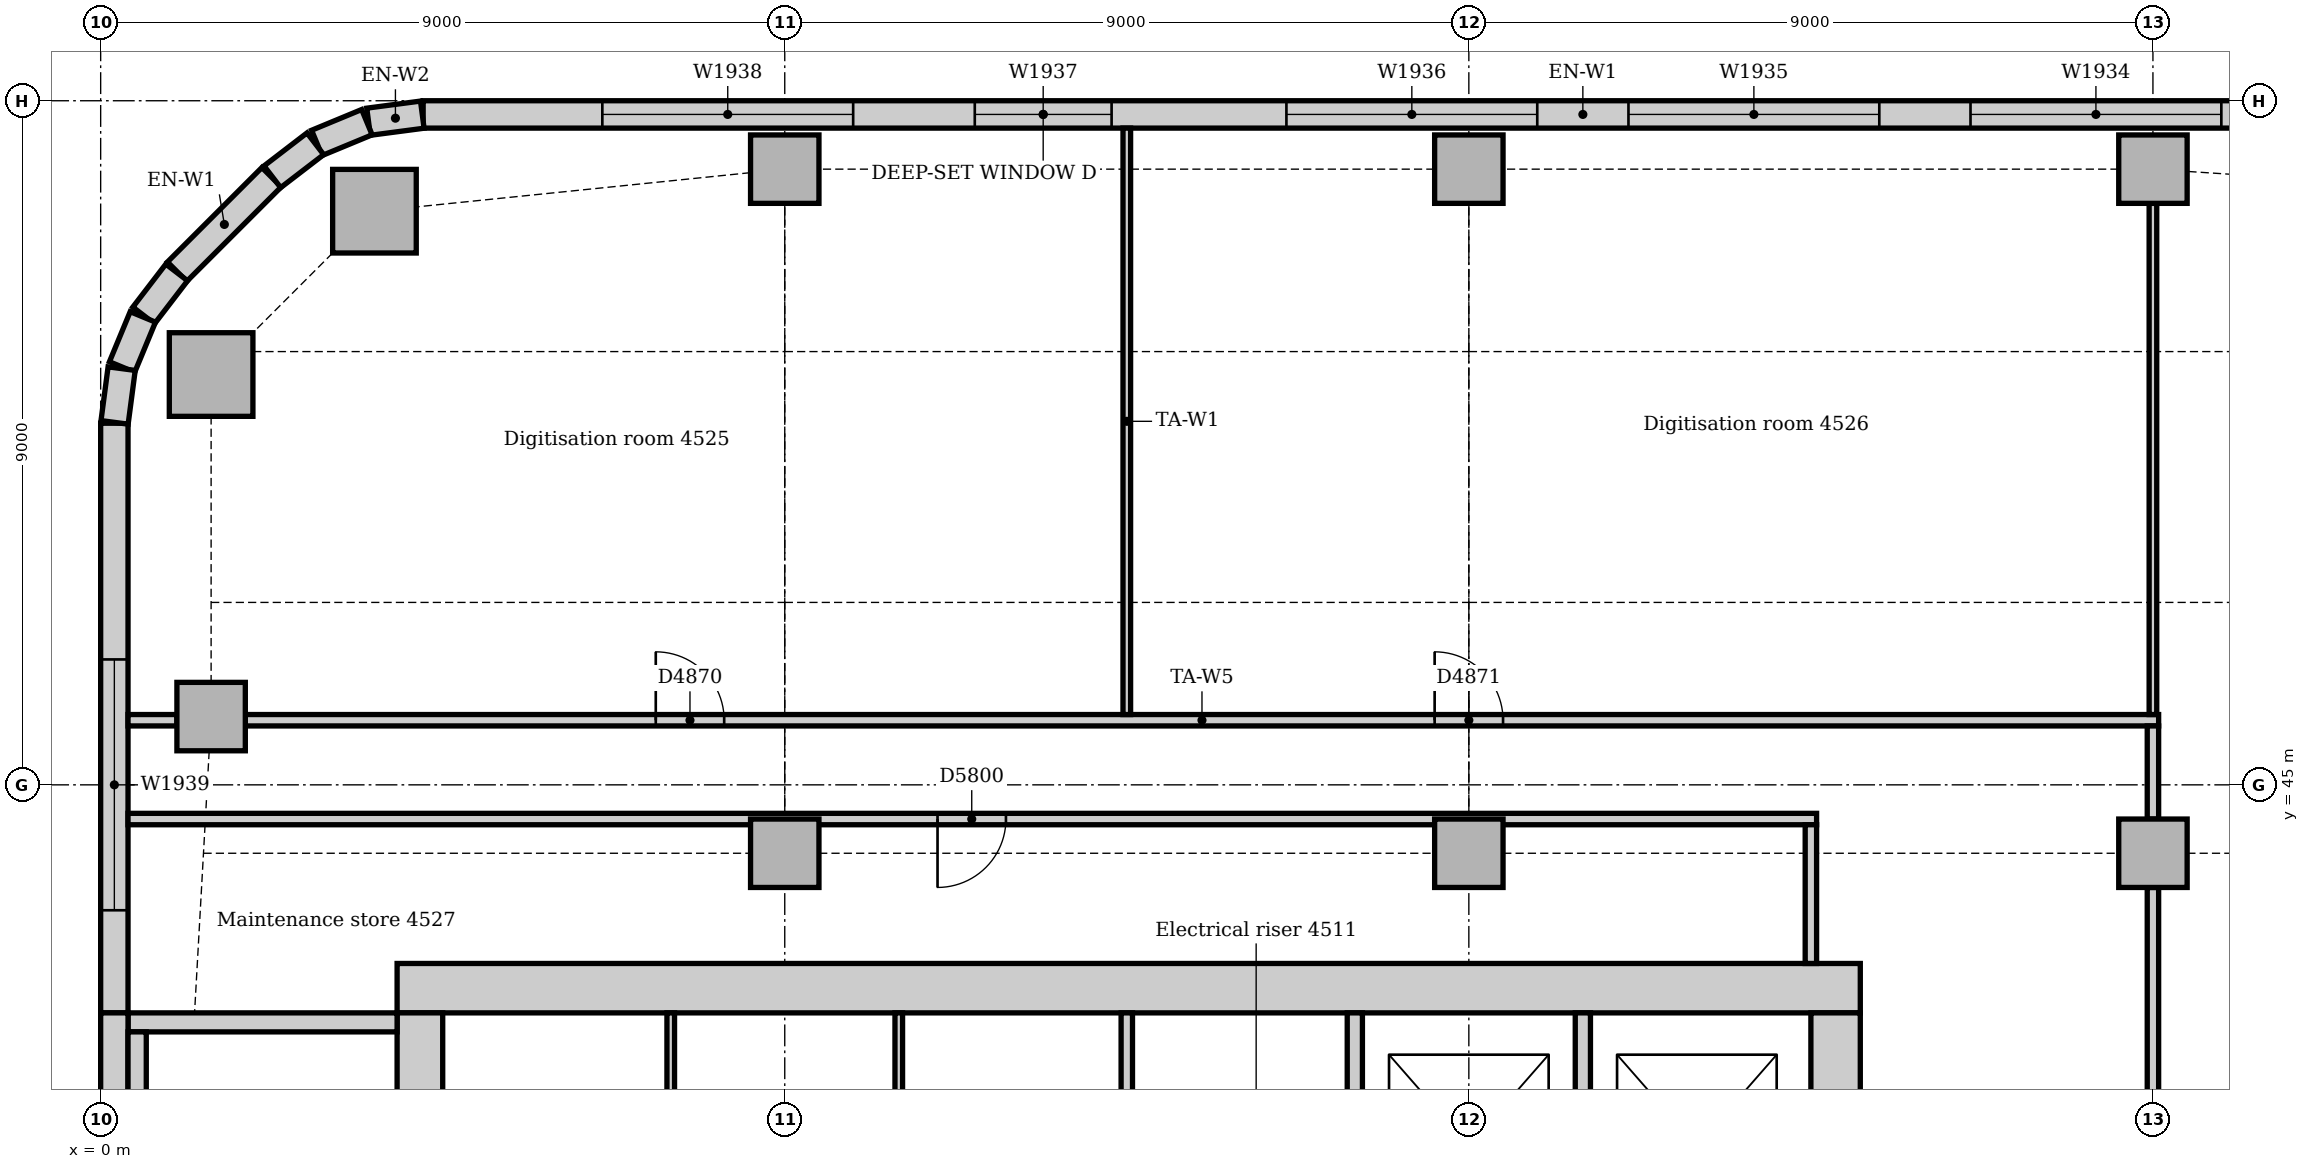
"""IFC4 building model, lengths in metres.
Left out: names, types, materials, properties, quantities, classifications, styles, units other than length and angle.
Written with IfcOpenShell. Run it as: python <this file> out.ifc"""

import sys

from ifc_helpers import new_model, si_unit, direction, frame, frame_2d, origin, origin_2d, place, context, subcontext, project, spatial, rectangle, extrude, element, fill, save


model = new_model("IFC4")
c1 = context("Model", 3, precision=1e-05, world=origin(), true_north=direction((0.0, 1.0)))
c2 = subcontext(c1, "Body", "Model", "MODEL_VIEW")
j1 = project(units=[si_unit("LENGTHUNIT", "METRE"), si_unit("PLANEANGLEUNIT", "RADIAN")], contexts=[c1])
p1 = place(None, origin())
s1 = spatial("IfcSite", under=j1, at=p1, CompositionType="ELEMENT")
p2 = place(p1, origin())
s2 = spatial("IfcBuilding", under=s1, at=p2, CompositionType="ELEMENT")
p3 = place(p2, frame((0.0, 0.0, 189.0)))
s3 = spatial("IfcBuildingStorey", under=s2, at=p3, CompositionType="ELEMENT", Elevation=189.0)
p4 = place(p3, frame((23.15, 42.325, 0.0), z_axis=(0.0, 0.0, 1.0), x_axis=(-1.0, 0.0, 0.0)))
e1 = element("IfcWall", 1, at=p4, inside=s3, PredefinedType="SOLIDWALL", context=c2, shape_type="SweptSolid", body=[
    extrude(rectangle(XDim=19.25, YDim=0.65, at=frame_2d((9.625, 0.0))), origin(), (0.0, 0.0, 1.0), 4.0),
])
p5 = place(p3, frame((22.825, 31.5, 0.0), z_axis=(0.0, 0.0, 1.0), x_axis=(0.0, 1.0, 0.0)))
e2 = element("IfcWall", 2, at=p5, inside=s3, PredefinedType="SOLIDWALL", context=c2, shape_type="SweptSolid", body=[
    extrude(rectangle(XDim=10.5, YDim=0.65, at=frame_2d((5.25, 0.0))), origin(), (0.0, 0.0, 1.0), 4.0),
])
p6 = place(p5, frame((3.15, 0.0, 0.0)))
e3 = element("IfcOpeningElement", 3, at=p6, cuts=e2, PredefinedType="OPENING", context=c2, shape_type="SweptSolid", body=[
    extrude(rectangle(XDim=1.0, YDim=2.1, at=frame_2d((0.5, 1.05))), frame((0.0, 0.335, 0.0), z_axis=(0.0, -1.0, 0.0), x_axis=(1.0, 0.0, 0.0)), (0.0, 0.0, 1.0), 0.67),
])
p7 = place(p5, frame((5.2, 0.0, 0.0)))
e4 = element("IfcOpeningElement", 4, at=p7, cuts=e2, PredefinedType="OPENING", context=c2, shape_type="SweptSolid", body=[
    extrude(rectangle(XDim=1.0, YDim=2.1, at=frame_2d((0.5, 1.05))), frame((0.0, 0.335, 0.0), z_axis=(0.0, -1.0, 0.0), x_axis=(1.0, 0.0, 0.0)), (0.0, 0.0, 1.0), 0.67),
])
p8 = place(p3, frame((4.2, 42.0, 0.0), z_axis=(0.0, 0.0, 1.0), x_axis=(0.0, -1.0, 0.0)))
e5 = element("IfcWall", 5, at=p8, inside=s3, PredefinedType="SOLIDWALL", context=c2, shape_type="SweptSolid", body=[
    extrude(rectangle(XDim=10.5, YDim=0.6, at=frame_2d((5.25, 0.0))), origin(), (0.0, 0.0, 1.0), 4.0),
])
p9 = place(p8, frame((5.3, 0.0, 0.0)))
e6 = element("IfcOpeningElement", 6, at=p9, cuts=e5, PredefinedType="OPENING", context=c2, shape_type="SweptSolid", body=[
    extrude(rectangle(XDim=1.0, YDim=2.1, at=frame_2d((0.5, 1.05))), frame((0.0, 0.31, 0.0), z_axis=(0.0, -1.0, 0.0), x_axis=(1.0, 0.0, 0.0)), (0.0, 0.0, 1.0), 0.62),
])
p10 = place(p3, frame((3.9, 41.875, 0.0), z_axis=(0.0, 0.0, 1.0), x_axis=(-1.0, 0.0, 0.0)))
e7 = element("IfcWall", 7, at=p10, inside=s3, PredefinedType="SOLIDWALL", context=c2, shape_type="SweptSolid", body=[
    extrude(rectangle(XDim=3.54, YDim=0.25, at=frame_2d((1.77, 0.0))), origin(), (0.0, 0.0, 1.0), 4.0),
])
for number, where, z_axis, x_axis in (
    (8, (3.602, 52.547, 0.0), (0.0, 0.0, 1.0), (1.0, 0.0, 0.0)),
    (9, (1.453, 50.398, 0.0), (0.0, 0.0, 1.0), (1.0, 0.0, 0.0)),
):
    element("IfcColumn", number, at=place(p3, frame(where, z_axis=z_axis, x_axis=x_axis)), inside=s3, PredefinedType="COLUMN", context=c2, shape_type="SweptSolid", body=[
        extrude(rectangle(XDim=1.1, YDim=1.1, at=origin_2d()), origin(), (0.0, 0.0, 1.0), 3.7),
    ])
for number, where, z_axis, x_axis in (
    (10, (9.0, 53.1, 0.0), (0.0, 0.0, 1.0), (1.0, 0.0, 0.0)),
    (11, (18.0, 53.1, 0.0), (0.0, 0.0, 1.0), (1.0, 0.0, 0.0)),
    (12, (27.0, 53.1, 0.0), (0.0, 0.0, 1.0), (1.0, 0.0, 0.0)),
    (13, (1.453, 45.898, 0.0), (0.0, 0.0, 1.0), (1.0, 0.0, 0.0)),
    (14, (9.0, 44.1, 0.0), (0.0, 0.0, 1.0), (1.0, 0.0, 0.0)),
    (15, (18.0, 44.1, 0.0), (0.0, 0.0, 1.0), (1.0, 0.0, 0.0)),
    (16, (27.0, 44.1, 0.0), (0.0, 0.0, 1.0), (1.0, 0.0, 0.0)),
):
    element("IfcColumn", number, at=place(p3, frame(where, z_axis=z_axis, x_axis=x_axis)), inside=s3, PredefinedType="COLUMN", context=c2, shape_type="SweptSolid", body=[
        extrude(rectangle(XDim=0.9, YDim=0.9, at=origin_2d()), origin(), (0.0, 0.0, 1.0), 3.7),
    ])
p11 = place(p3, frame((34.757, 53.82, 0.0), z_axis=(0.0, 0.0, 1.0), x_axis=(-1.0, 0.0, 0.0)))
e17 = element("IfcWall", 17, at=p11, inside=s3, PredefinedType="STANDARD", context=c2, shape_type="SweptSolid", body=[
    extrude(rectangle(XDim=30.515, YDim=0.36, at=frame_2d((15.257, 0.0))), origin(), (0.0, 0.0, 1.0), 3.7),
])
p12 = place(p11, frame((2.357, 0.0, 0.9)))
e18 = element("IfcOpeningElement", 18, at=p12, cuts=e17, PredefinedType="OPENING", context=c2, shape_type="SweptSolid", body=[
    extrude(rectangle(XDim=3.3, YDim=1.6, at=frame_2d((1.65, 0.8))), frame((0.0, 0.19, 0.0), z_axis=(0.0, -1.0, 0.0), x_axis=(1.0, 0.0, 0.0)), (0.0, 0.0, 1.0), 0.38),
])
p13 = place(p11, frame((6.857, 0.0, 0.9)))
e19 = element("IfcOpeningElement", 19, at=p13, cuts=e17, PredefinedType="OPENING", context=c2, shape_type="SweptSolid", body=[
    extrude(rectangle(XDim=3.3, YDim=1.6, at=frame_2d((1.65, 0.8))), frame((0.0, 0.19, 0.0), z_axis=(0.0, -1.0, 0.0), x_axis=(1.0, 0.0, 0.0)), (0.0, 0.0, 1.0), 0.38),
])
p14 = place(p11, frame((11.357, 0.0, 0.9)))
e20 = element("IfcOpeningElement", 20, at=p14, cuts=e17, PredefinedType="OPENING", context=c2, shape_type="SweptSolid", body=[
    extrude(rectangle(XDim=3.3, YDim=1.6, at=frame_2d((1.65, 0.8))), frame((0.0, 0.19, 0.0), z_axis=(0.0, -1.0, 0.0), x_axis=(1.0, 0.0, 0.0)), (0.0, 0.0, 1.0), 0.38),
])
p15 = place(p11, frame((15.857, 0.0, 0.9)))
e21 = element("IfcOpeningElement", 21, at=p15, cuts=e17, PredefinedType="OPENING", context=c2, shape_type="SweptSolid", body=[
    extrude(rectangle(XDim=3.3, YDim=1.6, at=frame_2d((1.65, 0.8))), frame((0.0, 0.19, 0.0), z_axis=(0.0, -1.0, 0.0), x_axis=(1.0, 0.0, 0.0)), (0.0, 0.0, 1.0), 0.38),
])
p16 = place(p11, frame((21.457, 0.0, 0.9)))
e22 = element("IfcOpeningElement", 22, at=p16, cuts=e17, PredefinedType="OPENING", context=c2, shape_type="SweptSolid", body=[
    extrude(rectangle(XDim=1.8, YDim=1.6, at=frame_2d((0.9, 0.8))), frame((0.0, 0.19, 0.0), z_axis=(0.0, -1.0, 0.0), x_axis=(1.0, 0.0, 0.0)), (0.0, 0.0, 1.0), 0.38),
])
p17 = place(p11, frame((24.857, 0.0, 0.9)))
e23 = element("IfcOpeningElement", 23, at=p17, cuts=e17, PredefinedType="OPENING", context=c2, shape_type="SweptSolid", body=[
    extrude(rectangle(XDim=3.3, YDim=1.6, at=frame_2d((1.65, 0.8))), frame((0.0, 0.19, 0.0), z_axis=(0.0, -1.0, 0.0), x_axis=(1.0, 0.0, 0.0)), (0.0, 0.0, 1.0), 0.38),
])
p18 = place(p3, frame((2.249, 52.994, 0.0), z_axis=(0.0, 0.0, 1.0), x_axis=(-0.707106781187, -0.707106781187, 0.0)))
e24 = element("IfcWall", 24, at=p18, inside=s3, PredefinedType="STANDARD", context=c2, shape_type="SweptSolid", body=[
    extrude(rectangle(XDim=1.757, YDim=0.36, at=frame_2d((0.879, 0.0))), origin(), (0.0, 0.0, 1.0), 3.7),
])
p19 = place(p3, frame((0.18, 49.757, 0.0), z_axis=(0.0, 0.0, 1.0), x_axis=(0.0, -1.0, 0.0)))
e25 = element("IfcWall", 25, at=p19, inside=s3, PredefinedType="STANDARD", context=c2, shape_type="SweptSolid", body=[
    extrude(rectangle(XDim=7.757, YDim=0.36, at=frame_2d((3.879, 0.0))), origin(), (0.0, 0.0, 1.0), 3.7),
])
p20 = place(p19, frame((3.107, 0.0, 0.9)))
e26 = element("IfcOpeningElement", 26, at=p20, cuts=e25, PredefinedType="OPENING", context=c2, shape_type="SweptSolid", body=[
    extrude(rectangle(XDim=3.3, YDim=1.6, at=frame_2d((1.65, 0.8))), frame((0.0, 0.19, 0.0), z_axis=(0.0, -1.0, 0.0), x_axis=(1.0, 0.0, 0.0)), (0.0, 0.0, 1.0), 0.38),
])
p21 = place(p3, frame((0.18, 42.0, 0.0), z_axis=(0.0, 0.0, 1.0), x_axis=(0.0, -1.0, 0.0)))
e27 = element("IfcWall", 27, at=p21, inside=s3, PredefinedType="STANDARD", context=c2, shape_type="SweptSolid", body=[
    extrude(rectangle(XDim=6.75, YDim=0.36, at=frame_2d((3.375, 0.0))), origin(), (0.0, 0.0, 1.0), 3.7),
])
for number, where, z_axis, x_axis in (
    (28, (4.231, 53.817, 0.0), (0.0, 0.0, 1.0), (-0.991, -0.131, 0.0)),
    (29, (3.503, 53.718, 0.0), (0.0, 0.0, 1.0), (-0.924, -0.383, 0.0)),
):
    element("IfcWall", number, at=place(p3, frame(where, z_axis=z_axis, x_axis=x_axis)), inside=s3, PredefinedType="STANDARD", context=c2, shape_type="SweptSolid", body=[
        extrude(rectangle(XDim=0.713, YDim=0.36, at=frame_2d((0.356, 0.0))), origin(), (0.0, 0.0, 1.0), 3.7),
    ])
for number, where, z_axis, x_axis in (
    (30, (2.825, 53.434, 0.0), (0.0, 0.0, 1.0), (-0.793, -0.609, 0.0)),
    (31, (1.0, 51.741, 0.0), (0.0, 0.0, 1.0), (-0.609, -0.793, 0.0)),
):
    element("IfcWall", number, at=place(p3, frame(where, z_axis=z_axis, x_axis=x_axis)), inside=s3, PredefinedType="STANDARD", context=c2, shape_type="SweptSolid", body=[
        extrude(rectangle(XDim=0.713, YDim=0.36, at=frame_2d((0.357, 0.0))), origin(), (0.0, 0.0, 1.0), 3.7),
    ])
for number, where, z_axis, x_axis in (
    (32, (0.555, 51.156, 0.0), (0.0, 0.0, 1.0), (-0.383, -0.924, 0.0)),
    (33, (0.276, 50.476, 0.0), (0.0, 0.0, 1.0), (-0.131, -0.991, 0.0)),
):
    element("IfcWall", number, at=place(p3, frame(where, z_axis=z_axis, x_axis=x_axis)), inside=s3, PredefinedType="STANDARD", context=c2, shape_type="SweptSolid", body=[
        extrude(rectangle(XDim=0.713, YDim=0.36, at=frame_2d((0.356, 0.0))), origin(), (0.0, 0.0, 1.0), 3.7),
    ])
p22 = place(p3, frame((0.48, 40.13, 0.0), z_axis=(0.0, 0.0, 1.0), x_axis=(0.0, 1.0, 0.0)))
e34 = element("IfcWall", 34, at=p22, inside=s3, PredefinedType="STANDARD", context=c2, shape_type="SweptSolid", body=[
    extrude(rectangle(XDim=1.62, YDim=0.24, at=frame_2d((0.81, 0.0))), origin(), (0.0, 0.0, 1.0), 4.0),
])
for number, where, z_axis, x_axis in (
    (35, (16.5, 38.6, 0.0), (0.0, 0.0, 1.0), (0.0, 1.0, 0.0)),
    (36, (19.5, 38.6, 0.0), (0.0, 0.0, 1.0), (0.0, 1.0, 0.0)),
):
    element("IfcWall", number, at=place(p3, frame(where, z_axis=z_axis, x_axis=x_axis)), inside=s3, PredefinedType="PARTITIONING", context=c2, shape_type="SweptSolid", body=[
        extrude(rectangle(XDim=3.4, YDim=0.2, at=frame_2d((1.7, 0.0))), origin(), (0.0, 0.0, 1.0), 3.7),
    ])
p23 = place(p3, frame((1.903, 45.85, 0.0), z_axis=(0.0, 0.0, 1.0), x_axis=(1.0, 0.0, 0.0)))
e37 = element("IfcWall", 37, at=p23, inside=s3, PredefinedType="PARTITIONING", context=c2, shape_type="SweptSolid", body=[
    extrude(rectangle(XDim=25.172, YDim=0.15, at=frame_2d((12.586, 0.0))), origin(), (0.0, 0.0, 1.0), 3.7),
])
p24 = place(p23, frame((5.4, 0.0, 0.0)))
e38 = element("IfcOpeningElement", 38, at=p24, cuts=e37, PredefinedType="OPENING", context=c2, shape_type="SweptSolid", body=[
    extrude(rectangle(XDim=0.9, YDim=2.1, at=frame_2d((0.45, 1.05))), frame((0.0, 0.085, 0.0), z_axis=(0.0, -1.0, 0.0), x_axis=(1.0, 0.0, 0.0)), (0.0, 0.0, 1.0), 0.17),
])
p25 = place(p23, frame((15.647, 0.0, 0.0)))
e39 = element("IfcOpeningElement", 39, at=p25, cuts=e37, PredefinedType="OPENING", context=c2, shape_type="SweptSolid", body=[
    extrude(rectangle(XDim=0.9, YDim=2.1, at=frame_2d((0.45, 1.05))), frame((0.0, 0.085, 0.0), z_axis=(0.0, -1.0, 0.0), x_axis=(1.0, 0.0, 0.0)), (0.0, 0.0, 1.0), 0.17),
])
p26 = place(p3, frame((0.36, 45.85, 0.0), z_axis=(0.0, 0.0, 1.0), x_axis=(1.0, 0.0, 0.0)))
e40 = element("IfcWall", 40, at=p26, inside=s3, PredefinedType="PARTITIONING", context=c2, shape_type="SweptSolid", body=[
    extrude(rectangle(XDim=0.643, YDim=0.15, at=frame_2d((0.322, 0.0))), origin(), (0.0, 0.0, 1.0), 3.7),
])
p27 = place(p3, frame((0.36, 44.55, 0.0), z_axis=(0.0, 0.0, 1.0), x_axis=(1.0, 0.0, 0.0)))
e41 = element("IfcWall", 41, at=p27, inside=s3, PredefinedType="PARTITIONING", context=c2, shape_type="SweptSolid", body=[
    extrude(rectangle(XDim=22.215, YDim=0.15, at=frame_2d((11.107, 0.0))), origin(), (0.0, 0.0, 1.0), 3.7),
])
p28 = place(p27, frame((10.65, 0.0, 0.0)))
e42 = element("IfcOpeningElement", 42, at=p28, cuts=e41, PredefinedType="OPENING", context=c2, shape_type="SweptSolid", body=[
    extrude(rectangle(XDim=0.9, YDim=2.1, at=frame_2d((0.45, 1.05))), frame((0.0, 0.085, 0.0), z_axis=(0.0, -1.0, 0.0), x_axis=(1.0, 0.0, 0.0)), (0.0, 0.0, 1.0), 0.17),
])
p29 = place(p3, frame((27.0, 36.45, 0.0), z_axis=(0.0, 0.0, 1.0), x_axis=(0.0, 1.0, 0.0)))
e43 = element("IfcWall", 43, at=p29, inside=s3, PredefinedType="PARTITIONING", context=c2, shape_type="SweptSolid", body=[
    extrude(rectangle(XDim=7.2, YDim=0.15, at=frame_2d((3.6, 0.0))), origin(), (0.0, 0.0, 1.0), 3.212),
])
p30 = place(p3, frame((27.0, 44.55, 0.0), z_axis=(0.0, 0.0, 1.0), x_axis=(0.0, 1.0, 0.0)))
e44 = element("IfcWall", 44, at=p30, inside=s3, PredefinedType="PARTITIONING", context=c2, shape_type="SweptSolid", body=[
    extrude(rectangle(XDim=1.225, YDim=0.15, at=frame_2d((0.613, 0.0))), origin(), (0.0, 0.0, 1.0), 3.212),
])
p31 = place(p3, frame((22.5, 42.65, 0.0), z_axis=(0.0, 0.0, 1.0), x_axis=(0.0, 1.0, 0.0)))
e45 = element("IfcWall", 45, at=p31, inside=s3, PredefinedType="PARTITIONING", context=c2, shape_type="SweptSolid", body=[
    extrude(rectangle(XDim=1.825, YDim=0.15, at=frame_2d((0.912, 0.0))), origin(), (0.0, 0.0, 1.0), 3.7),
])
p32 = place(p3, frame((13.5, 38.575, 0.0), z_axis=(0.0, 0.0, 1.0), x_axis=(0.0, 1.0, 0.0)))
e46 = element("IfcWall", 46, at=p32, inside=s3, PredefinedType="PARTITIONING", context=c2, shape_type="SweptSolid", body=[
    extrude(rectangle(XDim=3.425, YDim=0.15, at=frame_2d((1.712, 0.0))), origin(), (0.0, 0.0, 1.0), 3.7),
])
p33 = place(p3, frame((13.5, 45.925, 0.0), z_axis=(0.0, 0.0, 1.0), x_axis=(0.0, 1.0, 0.0)))
e47 = element("IfcWall", 47, at=p33, inside=s3, PredefinedType="PARTITIONING", context=c2, shape_type="SweptSolid", body=[
    extrude(rectangle(XDim=7.715, YDim=0.1, at=frame_2d((3.857, 0.0))), origin(), (0.0, 0.0, 1.0), 3.7),
])
p34 = place(p3, frame((27.0, 45.925, 0.0), z_axis=(0.0, 0.0, 1.0), x_axis=(0.0, 1.0, 0.0)))
e48 = element("IfcWall", 48, at=p34, inside=s3, PredefinedType="PARTITIONING", context=c2, shape_type="SweptSolid", body=[
    extrude(rectangle(XDim=6.725, YDim=0.1, at=frame_2d((3.362, 0.0))), origin(), (0.0, 0.0, 1.0), 3.212),
])
for number, where, z_axis, x_axis in (
    (49, (7.5, 38.575, 0.0), (0.0, 0.0, 1.0), (0.0, 1.0, 0.0)),
    (50, (10.5, 38.575, 0.0), (0.0, 0.0, 1.0), (0.0, 1.0, 0.0)),
):
    element("IfcWall", number, at=place(p3, frame(where, z_axis=z_axis, x_axis=x_axis)), inside=s3, PredefinedType="PARTITIONING", context=c2, shape_type="SweptSolid", body=[
        extrude(rectangle(XDim=3.425, YDim=0.1, at=frame_2d((1.712, 0.0))), origin(), (0.0, 0.0, 1.0), 3.7),
    ])
p35 = place(p13, origin())
e51 = element("IfcWindow", 51, at=p35, inside=s3, PartitioningType="SINGLE_PANEL", PredefinedType="WINDOW", context=c2, shape_type="SweptSolid", body=[
    extrude(rectangle(XDim=3.3, YDim=1.6, at=frame_2d((1.65, 0.8))), frame((0.0, 0.13, 0.0), z_axis=(0.0, -1.0, 0.0), x_axis=(1.0, 0.0, 0.0)), (0.0, 0.0, 1.0), 0.06),
])
fill(e19, e51)
p36 = place(p14, origin())
e52 = element("IfcWindow", 52, at=p36, inside=s3, PartitioningType="SINGLE_PANEL", PredefinedType="WINDOW", context=c2, shape_type="SweptSolid", body=[
    extrude(rectangle(XDim=3.3, YDim=1.6, at=frame_2d((1.65, 0.8))), frame((0.0, 0.13, 0.0), z_axis=(0.0, -1.0, 0.0), x_axis=(1.0, 0.0, 0.0)), (0.0, 0.0, 1.0), 0.06),
])
fill(e20, e52)
p37 = place(p15, origin())
e53 = element("IfcWindow", 53, at=p37, inside=s3, PartitioningType="SINGLE_PANEL", PredefinedType="WINDOW", context=c2, shape_type="SweptSolid", body=[
    extrude(rectangle(XDim=3.3, YDim=1.6, at=frame_2d((1.65, 0.8))), frame((0.0, 0.13, 0.0), z_axis=(0.0, -1.0, 0.0), x_axis=(1.0, 0.0, 0.0)), (0.0, 0.0, 1.0), 0.06),
])
fill(e21, e53)
p38 = place(p16, origin())
e54 = element("IfcWindow", 54, at=p38, inside=s3, PartitioningType="SINGLE_PANEL", PredefinedType="WINDOW", context=c2, shape_type="SweptSolid", body=[
    extrude(rectangle(XDim=1.8, YDim=1.6, at=frame_2d((0.9, 0.8))), frame((0.0, 0.13, 0.0), z_axis=(0.0, -1.0, 0.0), x_axis=(1.0, 0.0, 0.0)), (0.0, 0.0, 1.0), 0.06),
])
fill(e22, e54)
p39 = place(p17, origin())
e55 = element("IfcWindow", 55, at=p39, inside=s3, PartitioningType="SINGLE_PANEL", PredefinedType="WINDOW", context=c2, shape_type="SweptSolid", body=[
    extrude(rectangle(XDim=3.3, YDim=1.6, at=frame_2d((1.65, 0.8))), frame((0.0, 0.13, 0.0), z_axis=(0.0, -1.0, 0.0), x_axis=(1.0, 0.0, 0.0)), (0.0, 0.0, 1.0), 0.06),
])
fill(e23, e55)
p40 = place(p20, origin())
e56 = element("IfcWindow", 56, at=p40, inside=s3, PartitioningType="SINGLE_PANEL", PredefinedType="WINDOW", context=c2, shape_type="SweptSolid", body=[
    extrude(rectangle(XDim=3.3, YDim=1.6, at=frame_2d((1.65, 0.8))), frame((0.0, 0.13, 0.0), z_axis=(0.0, -1.0, 0.0), x_axis=(1.0, 0.0, 0.0)), (0.0, 0.0, 1.0), 0.06),
])
fill(e26, e56)
p41 = place(p24, origin())
e57 = element("IfcDoor", 57, at=p41, inside=s3, OperationType="SINGLE_SWING_LEFT", PredefinedType="DOOR", context=c2, shape_type="SweptSolid", body=[
    extrude(rectangle(XDim=0.9, YDim=2.1, at=frame_2d((0.45, 1.05))), frame((0.0, 0.025, 0.0), z_axis=(0.0, -1.0, 0.0), x_axis=(1.0, 0.0, 0.0)), (0.0, 0.0, 1.0), 0.05),
])
fill(e38, e57)
p42 = place(p25, origin())
e58 = element("IfcDoor", 58, at=p42, inside=s3, OperationType="SINGLE_SWING_LEFT", PredefinedType="DOOR", context=c2, shape_type="SweptSolid", body=[
    extrude(rectangle(XDim=0.9, YDim=2.1, at=frame_2d((0.45, 1.05))), frame((0.0, 0.025, 0.0), z_axis=(0.0, -1.0, 0.0), x_axis=(1.0, 0.0, 0.0)), (0.0, 0.0, 1.0), 0.05),
])
fill(e39, e58)
p43 = place(p28, frame((0.9, 0.0, 0.0), z_axis=(0.0, 0.0, 1.0), x_axis=(-1.0, 0.0, 0.0)))
e59 = element("IfcDoor", 59, at=p43, inside=s3, OperationType="SINGLE_SWING_RIGHT", PredefinedType="DOOR", context=c2, shape_type="SweptSolid", body=[
    extrude(rectangle(XDim=0.9, YDim=2.1, at=frame_2d((0.45, 1.05))), frame((0.0, 0.025, 0.0), z_axis=(0.0, -1.0, 0.0), x_axis=(1.0, 0.0, 0.0)), (0.0, 0.0, 1.0), 0.05),
])
fill(e42, e59)
save(model, sys.argv[1])
